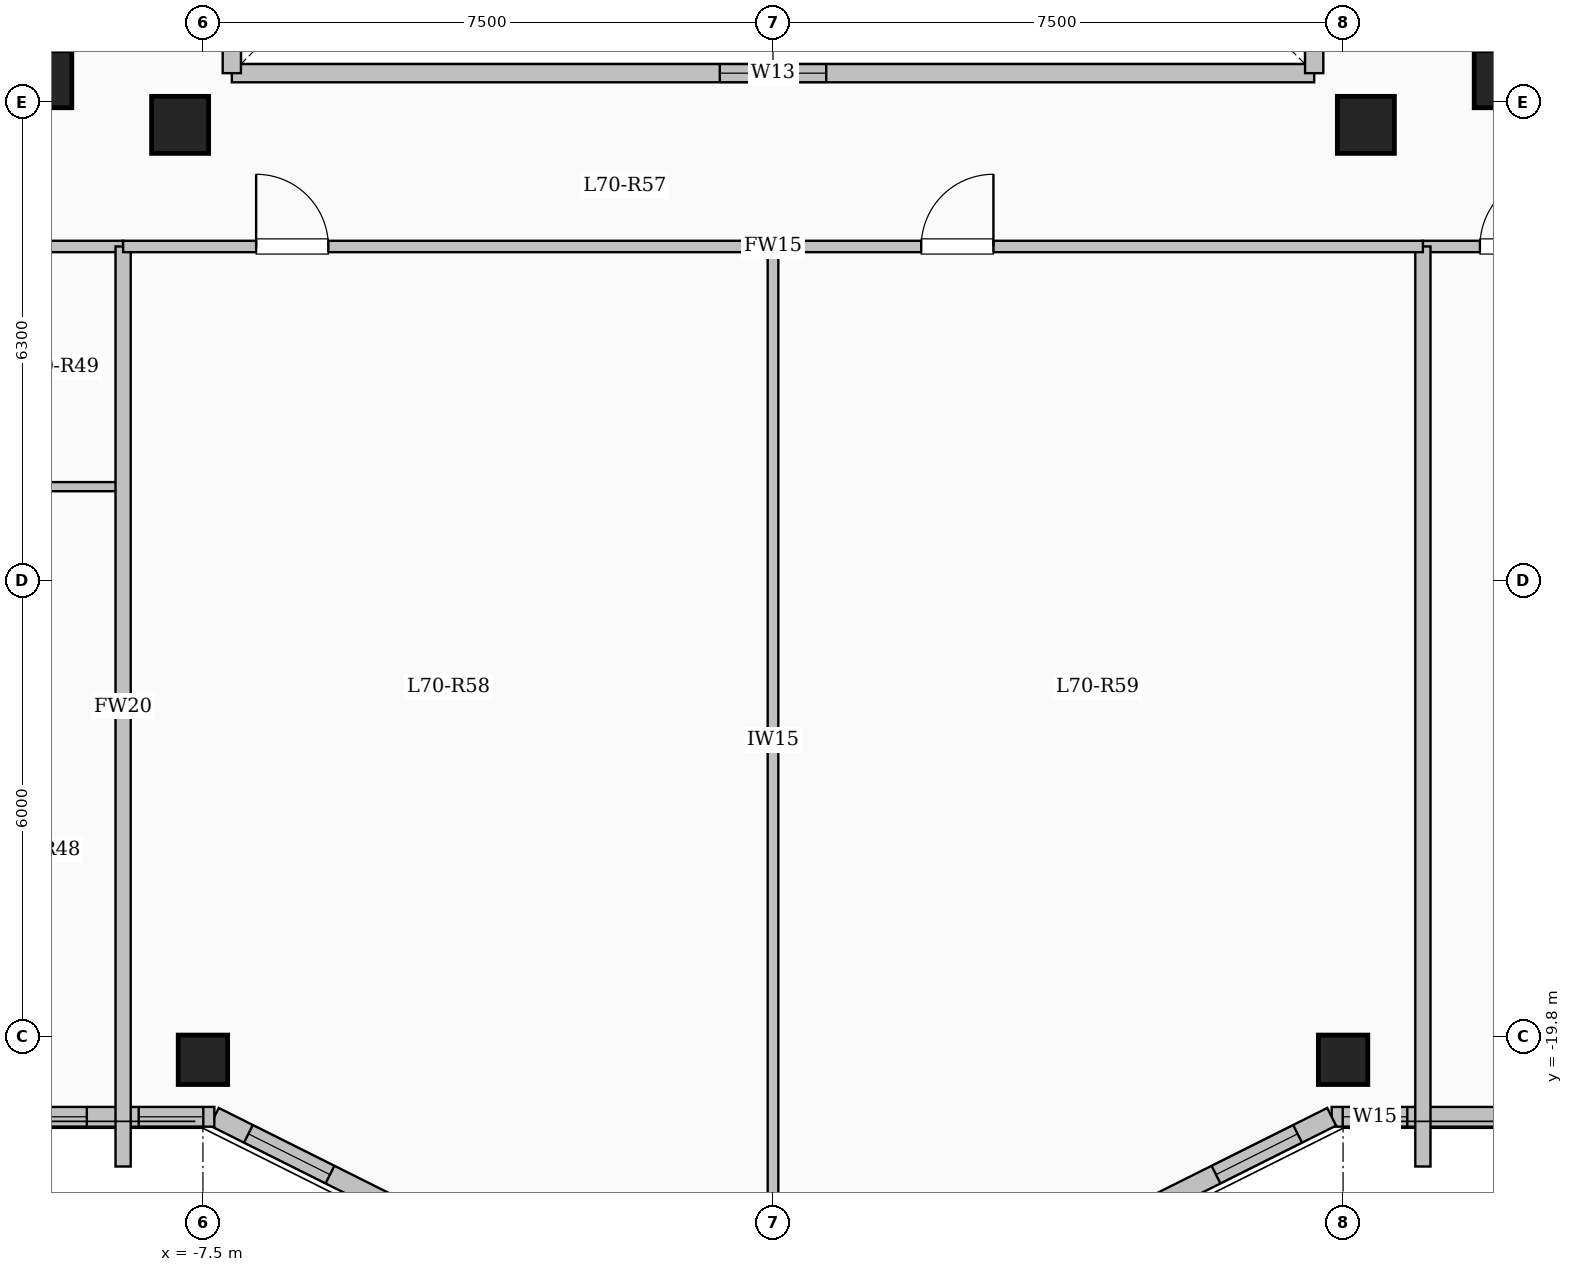
"""IFC4 building model, lengths in metres.
Left out: names, types, materials, properties, quantities, classifications, styles, units other than length and angle.
Written with IfcOpenShell. Run it as: python <this file> out.ifc"""

import sys

from ifc_helpers import new_model, si_unit, direction, frame, frame_2d, origin, origin_2d, place, context, subcontext, project, spatial, rectangle, extrude, element, fill, save


model = new_model("IFC4")
c1 = context("Model", 3, precision=1e-05, world=origin(), true_north=direction((0.0, 1.0)))
c2 = subcontext(c1, "Body", "Model", "MODEL_VIEW")
j1 = project(units=[si_unit("LENGTHUNIT", "METRE"), si_unit("PLANEANGLEUNIT", "RADIAN")], contexts=[c1])
p1 = place(None, origin())
s1 = spatial("IfcSite", under=j1, at=p1, CompositionType="ELEMENT")
p2 = place(p1, origin())
s2 = spatial("IfcBuilding", under=s1, at=p2, CompositionType="ELEMENT")
p3 = place(p2, frame((0.0, 0.0, 258.25)))
s3 = spatial("IfcBuildingStorey", under=s2, at=p3, CompositionType="ELEMENT", Elevation=258.25)
for number, where, z_axis, x_axis in (
    (1, (-7.8, -7.8, 0.0), (0.0, 0.0, 1.0), (1.0, 0.0, 0.0)),
    (2, (7.8, -7.8, 0.0), (0.0, 0.0, 1.0), (1.0, 0.0, 0.0)),
    (3, (-9.6, -7.2, 0.0), (0.0, 0.0, 1.0), (1.0, 0.0, 0.0)),
    (4, (9.6, -7.2, 0.0), (0.0, 0.0, 1.0), (1.0, 0.0, 0.0)),
):
    element("IfcColumn", number, at=place(p3, frame(where, z_axis=z_axis, x_axis=x_axis)), inside=s3, PredefinedType="COLUMN", context=c2, shape_type="SweptSolid", body=[
        extrude(rectangle(XDim=0.75, YDim=0.75, at=origin_2d()), origin(), (0.0, 0.0, 1.0), 3.35),
    ])
for number, where, z_axis, x_axis in (
    (5, (-7.5, -20.1, 0.0), (0.0, 0.0, 1.0), (1.0, 0.0, 0.0)),
    (6, (7.5, -20.1, 0.0), (0.0, 0.0, 1.0), (1.0, 0.0, 0.0)),
):
    element("IfcColumn", number, at=place(p3, frame(where, z_axis=z_axis, x_axis=x_axis)), inside=s3, PredefinedType="COLUMN", context=c2, shape_type="SweptSolid", body=[
        extrude(rectangle(XDim=0.65, YDim=0.65, at=origin_2d()), origin(), (0.0, 0.0, 1.0), 3.35),
    ])
p4 = place(p3, frame((-7.12, -7.12, 0.0), z_axis=(0.0, 0.0, 1.0), x_axis=(1.0, 0.0, 0.0)))
e7 = element("IfcWall", 7, at=p4, inside=s3, PredefinedType="SOLIDWALL", context=c2, shape_type="SweptSolid", body=[
    extrude(rectangle(XDim=14.24, YDim=0.24, at=frame_2d((7.12, 0.0))), origin(), (0.0, 0.0, 1.0), 3.1),
])
p5 = place(p4, frame((6.42, 0.0, 0.95)))
e8 = element("IfcOpeningElement", 8, at=p5, cuts=e7, PredefinedType="OPENING", context=c2, shape_type="SweptSolid", body=[
    extrude(rectangle(XDim=1.4, YDim=1.5, at=frame_2d((0.7, 0.75))), frame((0.0, 0.13, 0.0), z_axis=(0.0, -1.0, 0.0), x_axis=(1.0, 0.0, 0.0)), (0.0, 0.0, 1.0), 0.26),
])
p6 = place(p3, frame((7.12, -7.12, 0.0), z_axis=(0.0, 0.0, 1.0), x_axis=(0.0, 1.0, 0.0)))
e9 = element("IfcWall", 9, at=p6, inside=s3, PredefinedType="SOLIDWALL", context=c2, shape_type="SweptSolid", body=[
    extrude(rectangle(XDim=14.24, YDim=0.24, at=frame_2d((7.12, 0.0))), origin(), (0.0, 0.0, 1.0), 3.1),
])
p7 = place(p6, frame((6.42, 0.0, 0.95)))
e10 = element("IfcOpeningElement", 10, at=p7, cuts=e9, PredefinedType="OPENING", context=c2, shape_type="SweptSolid", body=[
    extrude(rectangle(XDim=1.4, YDim=1.5, at=frame_2d((0.7, 0.75))), frame((0.0, 0.13, 0.0), z_axis=(0.0, -1.0, 0.0), x_axis=(1.0, 0.0, 0.0)), (0.0, 0.0, 1.0), 0.26),
])
p8 = place(p3, frame((-7.12, 7.12, 0.0), z_axis=(0.0, 0.0, 1.0), x_axis=(0.0, -1.0, 0.0)))
e11 = element("IfcWall", 11, at=p8, inside=s3, PredefinedType="SOLIDWALL", context=c2, shape_type="SweptSolid", body=[
    extrude(rectangle(XDim=14.24, YDim=0.24, at=frame_2d((7.12, 0.0))), origin(), (0.0, 0.0, 1.0), 3.1),
])
p9 = place(p8, frame((6.42, 0.0, 0.95)))
e12 = element("IfcOpeningElement", 12, at=p9, cuts=e11, PredefinedType="OPENING", context=c2, shape_type="SweptSolid", body=[
    extrude(rectangle(XDim=1.4, YDim=1.5, at=frame_2d((0.7, 0.75))), frame((0.0, 0.13, 0.0), z_axis=(0.0, -1.0, 0.0), x_axis=(1.0, 0.0, 0.0)), (0.0, 0.0, 1.0), 0.26),
])
p10 = place(p3, frame((17.85, -20.85, 0.0), z_axis=(0.0, 0.0, 1.0), x_axis=(-1.0, 0.0, 0.0)))
e13 = element("IfcWall", 13, at=p10, inside=s3, PredefinedType="SOLIDWALL", context=c2, shape_type="SweptSolid", body=[
    extrude(rectangle(XDim=10.5, YDim=0.26, at=frame_2d((5.25, 0.0))), origin(), (0.0, 0.0, 1.0), 3.1),
])
p11 = place(p10, frame((0.489, 0.0, 0.95)))
e14 = element("IfcOpeningElement", 14, at=p11, cuts=e13, PredefinedType="OPENING", context=c2, shape_type="SweptSolid", body=[
    extrude(rectangle(XDim=1.2, YDim=1.5, at=frame_2d((0.6, 0.75))), frame((0.0, 0.14, 0.0), z_axis=(0.0, -1.0, 0.0), x_axis=(1.0, 0.0, 0.0)), (0.0, 0.0, 1.0), 0.28),
])
p12 = place(p10, frame((2.525, 0.0, 0.95)))
e15 = element("IfcOpeningElement", 15, at=p12, cuts=e13, PredefinedType="OPENING", context=c2, shape_type="SweptSolid", body=[
    extrude(rectangle(XDim=1.2, YDim=1.5, at=frame_2d((0.6, 0.75))), frame((0.0, 0.14, 0.0), z_axis=(0.0, -1.0, 0.0), x_axis=(1.0, 0.0, 0.0)), (0.0, 0.0, 1.0), 0.28),
])
p13 = place(p10, frame((4.501, 0.0, 0.95)))
e16 = element("IfcOpeningElement", 16, at=p13, cuts=e13, PredefinedType="OPENING", context=c2, shape_type="SweptSolid", body=[
    extrude(rectangle(XDim=1.2, YDim=1.5, at=frame_2d((0.6, 0.75))), frame((0.0, 0.14, 0.0), z_axis=(0.0, -1.0, 0.0), x_axis=(1.0, 0.0, 0.0)), (0.0, 0.0, 1.0), 0.28),
])
p14 = place(p10, frame((7.0, 0.0, 0.95)))
e17 = element("IfcOpeningElement", 17, at=p14, cuts=e13, PredefinedType="OPENING", context=c2, shape_type="SweptSolid", body=[
    extrude(rectangle(XDim=1.35, YDim=1.55, at=frame_2d((0.675, 0.775))), frame((0.0, 0.14, 0.0), z_axis=(0.0, -1.0, 0.0), x_axis=(1.0, 0.0, 0.0)), (0.0, 0.0, 1.0), 0.28),
])
p15 = place(p10, frame((9.505, 0.0, 0.95)))
e18 = element("IfcOpeningElement", 18, at=p15, cuts=e13, PredefinedType="OPENING", context=c2, shape_type="SweptSolid", body=[
    extrude(rectangle(XDim=0.85, YDim=1.5, at=frame_2d((0.425, 0.75))), frame((0.0, 0.14, 0.0), z_axis=(0.0, -1.0, 0.0), x_axis=(1.0, 0.0, 0.0)), (0.0, 0.0, 1.0), 0.28),
])
p16 = place(p3, frame((7.35, -20.85, 0.0), z_axis=(0.0, 0.0, 1.0), x_axis=(-0.894427191, -0.4472135955, 0.0)))
e19 = element("IfcWall", 19, at=p16, inside=s3, PredefinedType="SOLIDWALL", context=c2, shape_type="SweptSolid", body=[
    extrude(rectangle(XDim=3.354, YDim=0.26, at=frame_2d((1.677, 0.0))), origin(), (0.0, 0.0, 1.0), 3.1),
])
p17 = place(p16, frame((0.501, 0.0, 0.95)))
e20 = element("IfcOpeningElement", 20, at=p17, cuts=e19, PredefinedType="OPENING", context=c2, shape_type="SweptSolid", body=[
    extrude(rectangle(XDim=1.2, YDim=1.5, at=frame_2d((0.6, 0.75))), frame((0.0, 0.14, 0.0), z_axis=(0.0, -1.0, 0.0), x_axis=(1.0, 0.0, 0.0)), (0.0, 0.0, 1.0), 0.28),
])
p18 = place(p3, frame((-4.35, -22.35, 0.0), z_axis=(0.0, 0.0, 1.0), x_axis=(-0.894427191, 0.4472135955, 0.0)))
e21 = element("IfcWall", 21, at=p18, inside=s3, PredefinedType="SOLIDWALL", context=c2, shape_type="SweptSolid", body=[
    extrude(rectangle(XDim=3.354, YDim=0.26, at=frame_2d((1.677, 0.0))), origin(), (0.0, 0.0, 1.0), 3.1),
])
p19 = place(p18, frame((1.653, 0.0, 0.95)))
e22 = element("IfcOpeningElement", 22, at=p19, cuts=e21, PredefinedType="OPENING", context=c2, shape_type="SweptSolid", body=[
    extrude(rectangle(XDim=1.2, YDim=1.5, at=frame_2d((0.6, 0.75))), frame((0.0, 0.14, 0.0), z_axis=(0.0, -1.0, 0.0), x_axis=(1.0, 0.0, 0.0)), (0.0, 0.0, 1.0), 0.28),
])
p20 = place(p3, frame((-7.35, -20.85, 0.0), z_axis=(0.0, 0.0, 1.0), x_axis=(-1.0, 0.0, 0.0)))
e23 = element("IfcWall", 23, at=p20, inside=s3, PredefinedType="SOLIDWALL", context=c2, shape_type="SweptSolid", body=[
    extrude(rectangle(XDim=10.5, YDim=0.26, at=frame_2d((5.25, 0.0))), origin(), (0.0, 0.0, 1.0), 3.1),
])
p21 = place(p20, frame((0.145, 0.0, 0.95)))
e24 = element("IfcOpeningElement", 24, at=p21, cuts=e23, PredefinedType="OPENING", context=c2, shape_type="SweptSolid", body=[
    extrude(rectangle(XDim=0.85, YDim=1.5, at=frame_2d((0.425, 0.75))), frame((0.0, 0.14, 0.0), z_axis=(0.0, -1.0, 0.0), x_axis=(1.0, 0.0, 0.0)), (0.0, 0.0, 1.0), 0.28),
])
p22 = place(p20, frame((1.677, 0.0, 0.95)))
e25 = element("IfcOpeningElement", 25, at=p22, cuts=e23, PredefinedType="OPENING", context=c2, shape_type="SweptSolid", body=[
    extrude(rectangle(XDim=1.2, YDim=1.5, at=frame_2d((0.6, 0.75))), frame((0.0, 0.14, 0.0), z_axis=(0.0, -1.0, 0.0), x_axis=(1.0, 0.0, 0.0)), (0.0, 0.0, 1.0), 0.28),
])
p23 = place(p20, frame((4.0, 0.0, 0.95)))
e26 = element("IfcOpeningElement", 26, at=p23, cuts=e23, PredefinedType="OPENING", context=c2, shape_type="SweptSolid", body=[
    extrude(rectangle(XDim=1.2, YDim=1.5, at=frame_2d((0.6, 0.75))), frame((0.0, 0.14, 0.0), z_axis=(0.0, -1.0, 0.0), x_axis=(1.0, 0.0, 0.0)), (0.0, 0.0, 1.0), 0.28),
])
p24 = place(p20, frame((6.302, 0.0, 0.95)))
e27 = element("IfcOpeningElement", 27, at=p24, cuts=e23, PredefinedType="OPENING", context=c2, shape_type="SweptSolid", body=[
    extrude(rectangle(XDim=1.2, YDim=1.5, at=frame_2d((0.6, 0.75))), frame((0.0, 0.14, 0.0), z_axis=(0.0, -1.0, 0.0), x_axis=(1.0, 0.0, 0.0)), (0.0, 0.0, 1.0), 0.28),
])
p25 = place(p20, frame((8.575, 0.0, 0.95)))
e28 = element("IfcOpeningElement", 28, at=p25, cuts=e23, PredefinedType="OPENING", context=c2, shape_type="SweptSolid", body=[
    extrude(rectangle(XDim=1.2, YDim=1.5, at=frame_2d((0.6, 0.75))), frame((0.0, 0.14, 0.0), z_axis=(0.0, -1.0, 0.0), x_axis=(1.0, 0.0, 0.0)), (0.0, 0.0, 1.0), 0.28),
])
p26 = place(p3, frame((-17.75, -9.4, 0.0), z_axis=(0.0, 0.0, 1.0), x_axis=(1.0, 0.0, 0.0)))
e29 = element("IfcWall", 29, at=p26, inside=s3, PredefinedType="PARTITIONING", context=c2, shape_type="SweptSolid", body=[
    extrude(rectangle(XDim=9.2, YDim=0.15, at=frame_2d((4.6, 0.0))), origin(), (0.0, 0.0, 1.0), 3.1),
])
p27 = place(p26, frame((0.7, 0.0, 0.0)))
e30 = element("IfcOpeningElement", 30, at=p27, cuts=e29, PredefinedType="OPENING", context=c2, shape_type="SweptSolid", body=[
    extrude(rectangle(XDim=0.96, YDim=2.15, at=frame_2d((0.48, 1.075))), frame((0.0, 0.085, 0.0), z_axis=(0.0, -1.0, 0.0), x_axis=(1.0, 0.0, 0.0)), (0.0, 0.0, 1.0), 0.17),
])
p28 = place(p26, frame((5.275, 0.0, 0.0)))
e31 = element("IfcOpeningElement", 31, at=p28, cuts=e29, PredefinedType="OPENING", context=c2, shape_type="SweptSolid", body=[
    extrude(rectangle(XDim=0.96, YDim=2.15, at=frame_2d((0.48, 1.075))), frame((0.0, 0.085, 0.0), z_axis=(0.0, -1.0, 0.0), x_axis=(1.0, 0.0, 0.0)), (0.0, 0.0, 1.0), 0.17),
])
p29 = place(p3, frame((8.55, -9.4, 0.0), z_axis=(0.0, 0.0, 1.0), x_axis=(1.0, 0.0, 0.0)))
e32 = element("IfcWall", 32, at=p29, inside=s3, PredefinedType="PARTITIONING", context=c2, shape_type="SweptSolid", body=[
    extrude(rectangle(XDim=9.2, YDim=0.15, at=frame_2d((4.6, 0.0))), origin(), (0.0, 0.0, 1.0), 3.1),
])
p30 = place(p29, frame((0.75, 0.0, 0.0)))
e33 = element("IfcOpeningElement", 33, at=p30, cuts=e32, PredefinedType="OPENING", context=c2, shape_type="SweptSolid", body=[
    extrude(rectangle(XDim=0.96, YDim=2.15, at=frame_2d((0.48, 1.075))), frame((0.0, 0.085, 0.0), z_axis=(0.0, -1.0, 0.0), x_axis=(1.0, 0.0, 0.0)), (0.0, 0.0, 1.0), 0.17),
])
p31 = place(p3, frame((-10.775, -12.56, 0.0), z_axis=(0.0, 0.0, 1.0), x_axis=(1.0, 0.0, 0.0)))
e34 = element("IfcWall", 34, at=p31, inside=s3, PredefinedType="PARTITIONING", context=c2, shape_type="SweptSolid", body=[
    extrude(rectangle(XDim=2.235, YDim=0.12, at=frame_2d((1.117, 0.0))), origin(), (0.0, 0.0, 1.0), 2.785),
])
for number, where, z_axis, x_axis in (
    (35, (-8.55, -21.504, 0.0), (0.0, 0.0, 1.0), (0.0, 1.0, 0.0)),
    (36, (8.55, -21.504, 0.0), (0.0, 0.0, 1.0), (0.0, 1.0, 0.0)),
):
    element("IfcWall", number, at=place(p3, frame(where, z_axis=z_axis, x_axis=x_axis)), inside=s3, PredefinedType="SOLIDWALL", context=c2, shape_type="SweptSolid", body=[
        extrude(rectangle(XDim=12.104, YDim=0.2, at=frame_2d((6.052, 0.0))), origin(), (0.0, 0.0, 1.0), 3.1),
    ])
p32 = place(p3, frame((-8.55, -9.4, 0.0), z_axis=(0.0, 0.0, 1.0), x_axis=(1.0, 0.0, 0.0)))
e37 = element("IfcWall", 37, at=p32, inside=s3, PredefinedType="PARTITIONING", context=c2, shape_type="SweptSolid", body=[
    extrude(rectangle(XDim=17.1, YDim=0.15, at=frame_2d((8.55, 0.0))), origin(), (0.0, 0.0, 1.0), 3.1),
])
p33 = place(p32, frame((1.75, 0.0, 0.0)))
e38 = element("IfcOpeningElement", 38, at=p33, cuts=e37, PredefinedType="OPENING", context=c2, shape_type="SweptSolid", body=[
    extrude(rectangle(XDim=0.95, YDim=2.15, at=frame_2d((0.475, 1.075))), frame((0.0, 0.085, 0.0), z_axis=(0.0, -1.0, 0.0), x_axis=(1.0, 0.0, 0.0)), (0.0, 0.0, 1.0), 0.17),
])
p34 = place(p32, frame((10.5, 0.0, 0.0)))
e39 = element("IfcOpeningElement", 39, at=p34, cuts=e37, PredefinedType="OPENING", context=c2, shape_type="SweptSolid", body=[
    extrude(rectangle(XDim=0.95, YDim=2.15, at=frame_2d((0.475, 1.075))), frame((0.0, 0.085, 0.0), z_axis=(0.0, -1.0, 0.0), x_axis=(1.0, 0.0, 0.0)), (0.0, 0.0, 1.0), 0.17),
])
p35 = place(p3, frame((0.0, -22.38, 0.0), z_axis=(0.0, 0.0, 1.0), x_axis=(0.0, 1.0, 0.0)))
e40 = element("IfcWall", 40, at=p35, inside=s3, PredefinedType="PARTITIONING", context=c2, shape_type="SweptSolid", body=[
    extrude(rectangle(XDim=12.98, YDim=0.14, at=frame_2d((6.49, 0.0))), origin(), (0.0, 0.0, 1.0), 3.1),
])
p36 = place(p5, origin())
e41 = element("IfcWindow", 41, at=p36, inside=s3, PartitioningType="SINGLE_PANEL", PredefinedType="WINDOW", context=c2, shape_type="SweptSolid", body=[
    extrude(rectangle(XDim=1.4, YDim=1.5, at=frame_2d((0.7, 0.75))), frame((0.0, 0.03, 0.0), z_axis=(0.0, -1.0, 0.0), x_axis=(1.0, 0.0, 0.0)), (0.0, 0.0, 1.0), 0.06),
])
fill(e8, e41)
p37 = place(p15, origin())
e42 = element("IfcWindow", 42, at=p37, inside=s3, PartitioningType="SINGLE_PANEL", PredefinedType="WINDOW", context=c2, shape_type="SweptSolid", body=[
    extrude(rectangle(XDim=0.85, YDim=1.5, at=frame_2d((0.425, 0.75))), frame((0.0, 0.03, 0.0), z_axis=(0.0, -1.0, 0.0), x_axis=(1.0, 0.0, 0.0)), (0.0, 0.0, 1.0), 0.06),
])
fill(e18, e42)
p38 = place(p17, origin())
e43 = element("IfcWindow", 43, at=p38, inside=s3, PartitioningType="SINGLE_PANEL", PredefinedType="WINDOW", context=c2, shape_type="SweptSolid", body=[
    extrude(rectangle(XDim=1.2, YDim=1.5, at=frame_2d((0.6, 0.75))), frame((0.0, 0.03, 0.0), z_axis=(0.0, -1.0, 0.0), x_axis=(1.0, 0.0, 0.0)), (0.0, 0.0, 1.0), 0.06),
])
fill(e20, e43)
p39 = place(p19, origin())
e44 = element("IfcWindow", 44, at=p39, inside=s3, PartitioningType="SINGLE_PANEL", PredefinedType="WINDOW", context=c2, shape_type="SweptSolid", body=[
    extrude(rectangle(XDim=1.2, YDim=1.5, at=frame_2d((0.6, 0.75))), frame((0.0, 0.03, 0.0), z_axis=(0.0, -1.0, 0.0), x_axis=(1.0, 0.0, 0.0)), (0.0, 0.0, 1.0), 0.06),
])
fill(e22, e44)
p40 = place(p21, origin())
e45 = element("IfcWindow", 45, at=p40, inside=s3, PartitioningType="SINGLE_PANEL", PredefinedType="WINDOW", context=c2, shape_type="SweptSolid", body=[
    extrude(rectangle(XDim=0.85, YDim=1.5, at=frame_2d((0.425, 0.75))), frame((0.0, 0.03, 0.0), z_axis=(0.0, -1.0, 0.0), x_axis=(1.0, 0.0, 0.0)), (0.0, 0.0, 1.0), 0.06),
])
fill(e24, e45)
p41 = place(p22, origin())
e46 = element("IfcWindow", 46, at=p41, inside=s3, PartitioningType="SINGLE_PANEL", PredefinedType="WINDOW", context=c2, shape_type="SweptSolid", body=[
    extrude(rectangle(XDim=1.2, YDim=1.5, at=frame_2d((0.6, 0.75))), frame((0.0, 0.03, 0.0), z_axis=(0.0, -1.0, 0.0), x_axis=(1.0, 0.0, 0.0)), (0.0, 0.0, 1.0), 0.06),
])
fill(e25, e46)
p42 = place(p30, origin())
e47 = element("IfcDoor", 47, at=p42, inside=s3, OperationType="SINGLE_SWING_RIGHT", PredefinedType="DOOR", context=c2, shape_type="SweptSolid", body=[
    extrude(rectangle(XDim=0.96, YDim=2.15, at=frame_2d((0.48, 1.075))), frame((0.0, 0.025, 0.0), z_axis=(0.0, -1.0, 0.0), x_axis=(1.0, 0.0, 0.0)), (0.0, 0.0, 1.0), 0.05),
])
fill(e33, e47)
p43 = place(p33, origin())
e48 = element("IfcDoor", 48, at=p43, inside=s3, OperationType="SINGLE_SWING_LEFT", PredefinedType="DOOR", context=c2, shape_type="SweptSolid", body=[
    extrude(rectangle(XDim=0.95, YDim=2.15, at=frame_2d((0.475, 1.075))), frame((0.0, 0.025, 0.0), z_axis=(0.0, -1.0, 0.0), x_axis=(1.0, 0.0, 0.0)), (0.0, 0.0, 1.0), 0.05),
])
fill(e38, e48)
p44 = place(p34, origin())
e49 = element("IfcDoor", 49, at=p44, inside=s3, OperationType="SINGLE_SWING_RIGHT", PredefinedType="DOOR", context=c2, shape_type="SweptSolid", body=[
    extrude(rectangle(XDim=0.95, YDim=2.15, at=frame_2d((0.475, 1.075))), frame((0.0, 0.025, 0.0), z_axis=(0.0, -1.0, 0.0), x_axis=(1.0, 0.0, 0.0)), (0.0, 0.0, 1.0), 0.05),
])
fill(e39, e49)
save(model, sys.argv[1])
